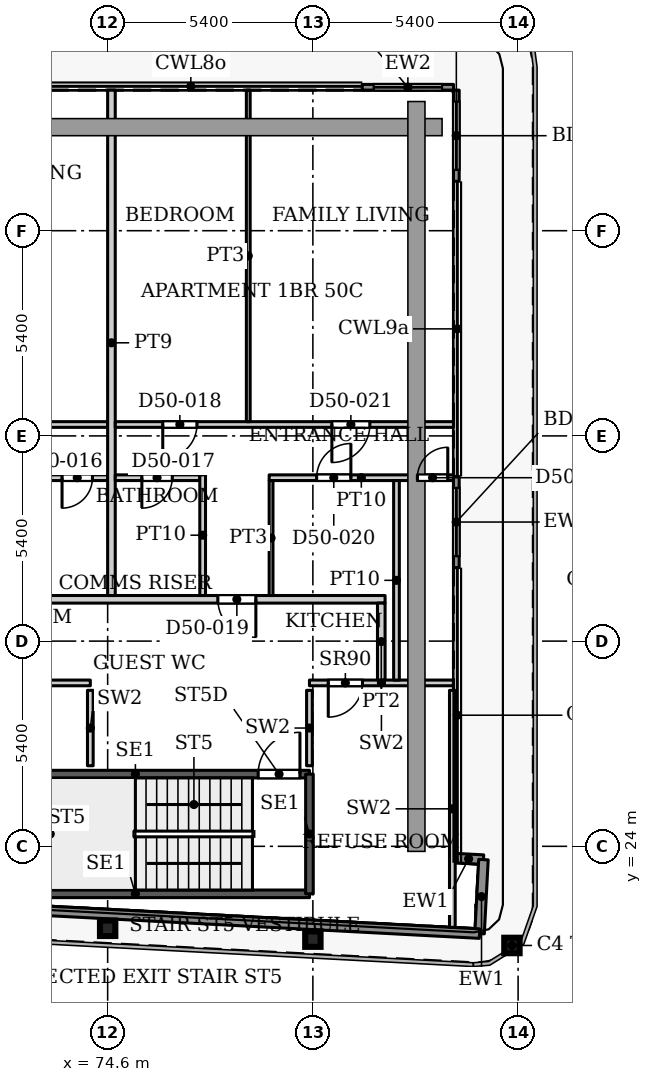
"""IFC4 building model, lengths in metres.
Left out: names, types, materials, properties, quantities, classifications, styles, units other than length and angle.
Written with IfcOpenShell. Run it as: python <this file> out.ifc"""

import sys

from ifc_helpers import new_model, si_unit, direction, frame, frame_2d, origin, origin_2d, place, context, subcontext, project, spatial, rectangle, i_section, extrude, source, transform, mapped, element, fill, save


model = new_model("IFC4")
c1 = context("Model", 3, precision=1e-05, world=origin(), true_north=direction((0.0, 1.0)))
c2 = subcontext(c1, "Body", "Model", "MODEL_VIEW")
j1 = project(units=[si_unit("LENGTHUNIT", "METRE"), si_unit("PLANEANGLEUNIT", "RADIAN")], contexts=[c1])
p1 = place(None, origin())
s1 = spatial("IfcSite", under=j1, at=p1, CompositionType="ELEMENT")
p2 = place(p1, origin())
s2 = spatial("IfcBuilding", under=s1, at=p2, CompositionType="ELEMENT")
p3 = place(p2, frame((0.0, 0.0, 216.2)))
s3 = spatial("IfcBuildingStorey", under=s2, at=p3, CompositionType="ELEMENT", Elevation=216.2)
for number, where, z_axis, x_axis in (
    (1, (85.238, 21.391, 0.0), (0.0, 0.0, 1.0), (1.0, 0.0, 0.0)),
    (2, (80.0, 21.558, 0.0), (0.0, 0.0, 1.0), (1.0, 0.0, 0.0)),
    (3, (74.6, 21.843, 0.0), (0.0, 0.0, 1.0), (1.0, 0.0, 0.0)),
):
    element("IfcColumn", number, at=place(p3, frame(where, z_axis=z_axis, x_axis=x_axis)), inside=s3, PredefinedType="COLUMN", context=c2, shape_type="SweptSolid", body=[
        extrude(i_section(OverallWidth=0.404, OverallDepth=0.407, WebThickness=0.027, FlangeThickness=0.044, FilletRadius=0.012, at=origin_2d()), origin(), (0.0, 0.0, 1.0), 3.9),
    ])
p4 = place(p3, frame((81.3, 43.975, 0.0), z_axis=(0.0, 0.0, 1.0), x_axis=(1.0, 0.0, 0.0)))
e4 = element("IfcWall", 4, at=p4, inside=s3, PredefinedType="SOLIDWALL", context=c2, shape_type="SweptSolid", body=[
    extrude(rectangle(XDim=2.4, YDim=0.15, at=frame_2d((1.2, 0.0))), origin(), (0.0, 0.0, 1.0), 3.75),
])
p5 = place(p4, frame((0.3, 0.0, 0.0)))
e5 = element("IfcOpeningElement", 5, at=p5, cuts=e4, PredefinedType="OPENING", context=c2, shape_type="SweptSolid", body=[
    extrude(rectangle(XDim=1.8, YDim=2.4, at=frame_2d((0.9, 1.2))), frame((0.0, 0.085, 0.0), z_axis=(0.0, -1.0, 0.0), x_axis=(1.0, 0.0, 0.0)), (0.0, 0.0, 1.0), 0.17),
])
p6 = place(p3, frame((83.775, 43.9, 0.0), z_axis=(0.0, 0.0, 1.0), x_axis=(0.0, -1.0, 0.0)))
e6 = element("IfcWall", 6, at=p6, inside=s3, PredefinedType="SOLIDWALL", context=c2, shape_type="SweptSolid", body=[
    extrude(rectangle(XDim=2.4, YDim=0.15, at=frame_2d((1.2, 0.0))), origin(), (0.0, 0.0, 1.0), 3.75),
])
p7 = place(p6, frame((0.3, 0.0, 0.0)))
e7 = element("IfcOpeningElement", 7, at=p7, cuts=e6, PredefinedType="OPENING", context=c2, shape_type="SweptSolid", body=[
    extrude(rectangle(XDim=1.8, YDim=2.4, at=frame_2d((0.9, 1.2))), frame((0.0, 0.085, 0.0), z_axis=(0.0, -1.0, 0.0), x_axis=(1.0, 0.0, 0.0)), (0.0, 0.0, 1.0), 0.17),
])
p8 = place(p3, frame((83.775, 33.733, 0.0), z_axis=(0.0, 0.0, 1.0), x_axis=(0.0, -1.0, 0.0)))
e8 = element("IfcWall", 8, at=p8, inside=s3, PredefinedType="SOLIDWALL", context=c2, shape_type="SweptSolid", body=[
    extrude(rectangle(XDim=2.399, YDim=0.15, at=frame_2d((1.199, 0.0))), origin(), (0.0, 0.0, 1.0), 3.75),
])
p9 = place(p8, frame((0.3, 0.0, 0.0)))
e9 = element("IfcOpeningElement", 9, at=p9, cuts=e8, PredefinedType="OPENING", context=c2, shape_type="SweptSolid", body=[
    extrude(rectangle(XDim=1.8, YDim=2.4, at=frame_2d((0.9, 1.2))), frame((0.0, 0.085, 0.0), z_axis=(0.0, -1.0, 0.0), x_axis=(1.0, 0.0, 0.0)), (0.0, 0.0, 1.0), 0.17),
])
p10 = place(p3, frame((83.707, 23.692, 0.0), z_axis=(0.0, 0.0, 1.0), x_axis=(0.998561284263, -0.053622398031, 0.0)))
e10 = element("IfcWall", 10, at=p10, inside=s3, PredefinedType="SOLIDWALL", context=c2, shape_type="SweptSolid", body=[
    extrude(rectangle(XDim=0.783, YDim=0.25, at=frame_2d((0.392, 0.0))), origin(), (0.0, 0.0, 1.0), 3.75),
])
p11 = place(p3, frame((84.489, 23.65, 0.0), z_axis=(0.0, 0.0, 1.0), x_axis=(-0.052841433274, -0.998602915542, 0.0)))
e11 = element("IfcWall", 11, at=p11, inside=s3, PredefinedType="SOLIDWALL", context=c2, shape_type="SweptSolid", body=[
    extrude(rectangle(XDim=1.95, YDim=0.25, at=frame_2d((0.975, 0.0))), origin(), (0.0, 0.0, 1.0), 3.75),
])
p12 = place(p3, frame((84.386, 21.703, 0.0), z_axis=(0.0, 0.0, 1.0), x_axis=(-0.998617508267, 0.05256493302, 0.0)))
e12 = element("IfcWall", 12, at=p12, inside=s3, PredefinedType="SOLIDWALL", context=c2, shape_type="SweptSolid", body=[
    extrude(rectangle(XDim=50.417, YDim=0.25, at=frame_2d((25.208, 0.0))), origin(), (0.0, 0.0, 1.0), 3.75),
])
p13 = place(p3, frame((70.75, 22.75, 0.0), z_axis=(0.0, 0.0, 1.0), x_axis=(1.0, 0.0, 0.0)))
e13 = element("IfcWall", 13, at=p13, inside=s3, PredefinedType="SHEAR", context=c2, shape_type="SweptSolid", body=[
    extrude(rectangle(XDim=9.16, YDim=0.2, at=frame_2d((4.58, 0.0))), origin(), (0.0, 0.0, 1.0), 3.9),
])
p14 = place(p3, frame((70.75, 25.9, 0.0), z_axis=(0.0, 0.0, 1.0), x_axis=(1.0, 0.0, 0.0)))
e14 = element("IfcWall", 14, at=p14, inside=s3, PredefinedType="SHEAR", context=c2, shape_type="SweptSolid", body=[
    extrude(rectangle(XDim=9.16, YDim=0.2, at=frame_2d((4.58, 0.0))), origin(), (0.0, 0.0, 1.0), 3.9),
])
p15 = place(p14, frame((7.81, 0.0, 0.0)))
e15 = element("IfcOpeningElement", 15, at=p15, cuts=e14, PredefinedType="OPENING", context=c2, shape_type="SweptSolid", body=[
    extrude(rectangle(XDim=1.1, YDim=2.2, at=frame_2d((0.55, 1.1))), frame((0.0, 0.11, 0.0), z_axis=(0.0, -1.0, 0.0), x_axis=(1.0, 0.0, 0.0)), (0.0, 0.0, 1.0), 0.22),
])
p16 = place(p3, frame((79.91, 22.75, 0.0), z_axis=(0.0, 0.0, 1.0), x_axis=(0.0, 1.0, 0.0)))
e16 = element("IfcWall", 16, at=p16, inside=s3, PredefinedType="SHEAR", context=c2, shape_type="SweptSolid", body=[
    extrude(rectangle(XDim=3.15, YDim=0.2, at=frame_2d((1.575, 0.0))), origin(), (0.0, 0.0, 1.0), 3.9),
])
p17 = place(p3, frame((70.75, 28.3, 0.0), z_axis=(0.0, 0.0, 1.0), x_axis=(1.0, 0.0, 0.0)))
e17 = element("IfcWall", 17, at=p17, inside=s3, PredefinedType="PARTITIONING", context=c2, shape_type="SweptSolid", body=[
    extrude(rectangle(XDim=3.394, YDim=0.15, at=frame_2d((1.697, 0.0))), origin(), (0.0, 0.0, 1.0), 3.9),
])
p18 = place(p17, frame((1.247, 0.0, 0.0)))
e18 = element("IfcOpeningElement", 18, at=p18, cuts=e17, PredefinedType="OPENING", context=c2, shape_type="SweptSolid", body=[
    extrude(rectangle(XDim=0.9, YDim=2.2, at=frame_2d((0.45, 1.1))), frame((0.0, 0.085, 0.0), z_axis=(0.0, -1.0, 0.0), x_axis=(1.0, 0.0, 0.0)), (0.0, 0.0, 1.0), 0.17),
])
p19 = place(p3, frame((74.144, 26.12, 0.0), z_axis=(0.0, 0.0, 1.0), x_axis=(0.0, 1.0, 0.0)))
e19 = element("IfcWall", 19, at=p19, inside=s3, PredefinedType="PARTITIONING", context=c2, shape_type="SweptSolid", body=[
    extrude(rectangle(XDim=1.985, YDim=0.15, at=frame_2d((0.992, 0.0))), origin(), (0.0, 0.0, 1.0), 3.9),
])
p20 = place(p3, frame((79.91, 28.3, 0.0), z_axis=(0.0, 0.0, 1.0), x_axis=(1.0, 0.0, 0.0)))
e20 = element("IfcWall", 20, at=p20, inside=s3, PredefinedType="PARTITIONING", context=c2, shape_type="SweptSolid", body=[
    extrude(rectangle(XDim=3.788, YDim=0.15, at=frame_2d((1.894, 0.0))), origin(), (0.0, 0.0, 1.0), 3.9),
])
p21 = place(p20, frame((0.495, 0.0, 0.0)))
e21 = element("IfcOpeningElement", 21, at=p21, cuts=e20, PredefinedType="OPENING", context=c2, shape_type="SweptSolid", body=[
    extrude(rectangle(XDim=0.9, YDim=2.2, at=frame_2d((0.45, 1.1))), frame((0.0, 0.085, 0.0), z_axis=(0.0, -1.0, 0.0), x_axis=(1.0, 0.0, 0.0)), (0.0, 0.0, 1.0), 0.17),
])
p22 = place(p3, frame((79.91, 26.12, 0.0), z_axis=(0.0, 0.0, 1.0), x_axis=(0.0, 1.0, 0.0)))
e22 = element("IfcWall", 22, at=p22, inside=s3, PredefinedType="PARTITIONING", context=c2, shape_type="SweptSolid", body=[
    extrude(rectangle(XDim=1.985, YDim=0.15, at=frame_2d((0.992, 0.0))), origin(), (0.0, 0.0, 1.0), 3.9),
])
p23 = place(p3, frame((83.67, 21.868, 0.0), z_axis=(0.0, 0.0, 1.0), x_axis=(0.0, 1.0, 0.0)))
e23 = element("IfcWall", 23, at=p23, inside=s3, PredefinedType="PARTITIONING", context=c2, shape_type="SweptSolid", body=[
    extrude(rectangle(XDim=6.237, YDim=0.15, at=frame_2d((3.119, 0.0))), origin(), (0.0, 0.0, 1.0), 3.9),
])
p24 = place(p3, frame((53.499, 30.5, 0.0), z_axis=(0.0, 0.0, 1.0), x_axis=(1.0, 0.0, 0.0)))
e24 = element("IfcWall", 24, at=p24, inside=s3, PredefinedType="PARTITIONING", context=c2, shape_type="SweptSolid", body=[
    extrude(rectangle(XDim=28.401, YDim=0.2, at=frame_2d((14.2, 0.0))), origin(), (0.0, 0.0, 1.0), 3.6),
])
p25 = place(p24, frame((10.201, 0.0, 0.0)))
e25 = element("IfcOpeningElement", 25, at=p25, cuts=e24, PredefinedType="OPENING", context=c2, shape_type="SweptSolid", body=[
    extrude(rectangle(XDim=1.0, YDim=2.1, at=frame_2d((0.5, 1.05))), frame((0.0, 0.11, 0.0), z_axis=(0.0, -1.0, 0.0), x_axis=(1.0, 0.0, 0.0)), (0.0, 0.0, 1.0), 0.22),
])
p26 = place(p24, frame((12.151, 0.0, 0.0)))
e26 = element("IfcOpeningElement", 26, at=p26, cuts=e24, PredefinedType="OPENING", context=c2, shape_type="SweptSolid", body=[
    extrude(rectangle(XDim=1.0, YDim=2.1, at=frame_2d((0.5, 1.05))), frame((0.0, 0.11, 0.0), z_axis=(0.0, -1.0, 0.0), x_axis=(1.0, 0.0, 0.0)), (0.0, 0.0, 1.0), 0.22),
])
p27 = place(p24, frame((24.001, 0.0, 0.0)))
e27 = element("IfcOpeningElement", 27, at=p27, cuts=e24, PredefinedType="OPENING", context=c2, shape_type="SweptSolid", body=[
    extrude(rectangle(XDim=1.0, YDim=2.1, at=frame_2d((0.5, 1.05))), frame((0.0, 0.11, 0.0), z_axis=(0.0, -1.0, 0.0), x_axis=(1.0, 0.0, 0.0)), (0.0, 0.0, 1.0), 0.22),
])
p28 = place(p3, frame((65.2, 35.1, 0.0), z_axis=(0.0, 0.0, 1.0), x_axis=(1.0, 0.0, 0.0)))
e28 = element("IfcWall", 28, at=p28, inside=s3, PredefinedType="PARTITIONING", context=c2, shape_type="SweptSolid", body=[
    extrude(rectangle(XDim=9.4, YDim=0.15, at=frame_2d((4.7, 0.0))), origin(), (0.0, 0.0, 1.0), 3.6),
])
p29 = place(p28, frame((1.4, 0.0, 0.0)))
e29 = element("IfcOpeningElement", 29, at=p29, cuts=e28, PredefinedType="OPENING", context=c2, shape_type="SweptSolid", body=[
    extrude(rectangle(XDim=0.9, YDim=2.1, at=frame_2d((0.45, 1.05))), frame((0.0, 0.085, 0.0), z_axis=(0.0, -1.0, 0.0), x_axis=(1.0, 0.0, 0.0)), (0.0, 0.0, 1.0), 0.17),
])
p30 = place(p28, frame((6.15, 0.0, 0.0)))
e30 = element("IfcOpeningElement", 30, at=p30, cuts=e28, PredefinedType="OPENING", context=c2, shape_type="SweptSolid", body=[
    extrude(rectangle(XDim=1.0, YDim=2.1, at=frame_2d((0.5, 1.05))), frame((0.0, 0.085, 0.0), z_axis=(0.0, -1.0, 0.0), x_axis=(1.0, 0.0, 0.0)), (0.0, 0.0, 1.0), 0.17),
])
p31 = place(p3, frame((67.125, 33.7, 0.0), z_axis=(0.0, 0.0, 1.0), x_axis=(1.0, 0.0, 0.0)))
e31 = element("IfcWall", 31, at=p31, inside=s3, PredefinedType="PARTITIONING", context=c2, shape_type="SweptSolid", body=[
    extrude(rectangle(XDim=7.475, YDim=0.15, at=frame_2d((3.738, 0.0))), origin(), (0.0, 0.0, 1.0), 3.6),
])
p32 = place(p31, frame((0.875, 0.0, 0.0)))
e32 = element("IfcOpeningElement", 32, at=p32, cuts=e31, PredefinedType="OPENING", context=c2, shape_type="SweptSolid", body=[
    extrude(rectangle(XDim=0.8, YDim=2.1, at=frame_2d((0.4, 1.05))), frame((0.0, 0.085, 0.0), z_axis=(0.0, -1.0, 0.0), x_axis=(1.0, 0.0, 0.0)), (0.0, 0.0, 1.0), 0.17),
])
p33 = place(p31, frame((3.675, 0.0, 0.0)))
e33 = element("IfcOpeningElement", 33, at=p33, cuts=e31, PredefinedType="OPENING", context=c2, shape_type="SweptSolid", body=[
    extrude(rectangle(XDim=0.9, YDim=2.1, at=frame_2d((0.45, 1.05))), frame((0.0, 0.085, 0.0), z_axis=(0.0, -1.0, 0.0), x_axis=(1.0, 0.0, 0.0)), (0.0, 0.0, 1.0), 0.17),
])
p34 = place(p31, frame((6.275, 0.0, 0.0)))
e34 = element("IfcOpeningElement", 34, at=p34, cuts=e31, PredefinedType="OPENING", context=c2, shape_type="SweptSolid", body=[
    extrude(rectangle(XDim=0.8, YDim=2.1, at=frame_2d((0.4, 1.05))), frame((0.0, 0.085, 0.0), z_axis=(0.0, -1.0, 0.0), x_axis=(1.0, 0.0, 0.0)), (0.0, 0.0, 1.0), 0.17),
])
p35 = place(p3, frame((74.7, 30.6, 0.0), z_axis=(0.0, 0.0, 1.0), x_axis=(0.0, 1.0, 0.0)))
e35 = element("IfcWall", 35, at=p35, inside=s3, PredefinedType="PARTITIONING", context=c2, shape_type="SweptSolid", body=[
    extrude(rectangle(XDim=13.3, YDim=0.2, at=frame_2d((6.65, 0.0))), origin(), (0.0, 0.0, 1.0), 3.6),
])
p36 = place(p3, frame((74.8, 33.7, 0.0), z_axis=(0.0, 0.0, 1.0), x_axis=(1.0, 0.0, 0.0)))
e36 = element("IfcWall", 36, at=p36, inside=s3, PredefinedType="PARTITIONING", context=c2, shape_type="SweptSolid", body=[
    extrude(rectangle(XDim=2.225, YDim=0.15, at=frame_2d((1.112, 0.0))), origin(), (0.0, 0.0, 1.0), 3.6),
])
p37 = place(p36, frame((0.7, 0.0, 0.0)))
e37 = element("IfcOpeningElement", 37, at=p37, cuts=e36, PredefinedType="OPENING", context=c2, shape_type="SweptSolid", body=[
    extrude(rectangle(XDim=0.8, YDim=2.1, at=frame_2d((0.4, 1.05))), frame((0.0, 0.085, 0.0), z_axis=(0.0, -1.0, 0.0), x_axis=(1.0, 0.0, 0.0)), (0.0, 0.0, 1.0), 0.17),
])
p38 = place(p3, frame((74.8, 35.1, 0.0), z_axis=(0.0, 0.0, 1.0), x_axis=(1.0, 0.0, 0.0)))
e38 = element("IfcWall", 38, at=p38, inside=s3, PredefinedType="PARTITIONING", context=c2, shape_type="SweptSolid", body=[
    extrude(rectangle(XDim=8.9, YDim=0.15, at=frame_2d((4.45, 0.0))), origin(), (0.0, 0.0, 1.0), 3.6),
])
p39 = place(p38, frame((1.25, 0.0, 0.0)))
e39 = element("IfcOpeningElement", 39, at=p39, cuts=e38, PredefinedType="OPENING", context=c2, shape_type="SweptSolid", body=[
    extrude(rectangle(XDim=0.9, YDim=2.1, at=frame_2d((0.45, 1.05))), frame((0.0, 0.085, 0.0), z_axis=(0.0, -1.0, 0.0), x_axis=(1.0, 0.0, 0.0)), (0.0, 0.0, 1.0), 0.17),
])
p40 = place(p38, frame((5.7, 0.0, 0.0)))
e40 = element("IfcOpeningElement", 40, at=p40, cuts=e38, PredefinedType="OPENING", context=c2, shape_type="SweptSolid", body=[
    extrude(rectangle(XDim=1.0, YDim=2.1, at=frame_2d((0.5, 1.05))), frame((0.0, 0.085, 0.0), z_axis=(0.0, -1.0, 0.0), x_axis=(1.0, 0.0, 0.0)), (0.0, 0.0, 1.0), 0.17),
])
p41 = place(p3, frame((77.1, 30.6, 0.0), z_axis=(0.0, 0.0, 1.0), x_axis=(0.0, 1.0, 0.0)))
e41 = element("IfcWall", 41, at=p41, inside=s3, PredefinedType="PARTITIONING", context=c2, shape_type="SweptSolid", body=[
    extrude(rectangle(XDim=3.175, YDim=0.15, at=frame_2d((1.587, 0.0))), origin(), (0.0, 0.0, 1.0), 3.6),
])
p42 = place(p3, frame((78.3, 35.175, 0.0), z_axis=(0.0, 0.0, 1.0), x_axis=(0.0, 1.0, 0.0)))
e42 = element("IfcWall", 42, at=p42, inside=s3, PredefinedType="PARTITIONING", context=c2, shape_type="SweptSolid", body=[
    extrude(rectangle(XDim=8.725, YDim=0.1, at=frame_2d((4.362, 0.0))), origin(), (0.0, 0.0, 1.0), 3.6),
])
p43 = place(p3, frame((78.85, 33.7, 0.0), z_axis=(0.0, 0.0, 1.0), x_axis=(1.0, 0.0, 0.0)))
e43 = element("IfcWall", 43, at=p43, inside=s3, PredefinedType="PARTITIONING", context=c2, shape_type="SweptSolid", body=[
    extrude(rectangle(XDim=4.85, YDim=0.15, at=frame_2d((2.425, 0.0))), origin(), (0.0, 0.0, 1.0), 3.6),
])
p44 = place(p43, frame((1.25, 0.0, 0.0)))
e44 = element("IfcOpeningElement", 44, at=p44, cuts=e43, PredefinedType="OPENING", context=c2, shape_type="SweptSolid", body=[
    extrude(rectangle(XDim=0.9, YDim=2.1, at=frame_2d((0.45, 1.05))), frame((0.0, 0.085, 0.0), z_axis=(0.0, -1.0, 0.0), x_axis=(1.0, 0.0, 0.0)), (0.0, 0.0, 1.0), 0.17),
])
p45 = place(p43, frame((3.9, 0.0, 0.0)))
e45 = element("IfcOpeningElement", 45, at=p45, cuts=e43, PredefinedType="OPENING", context=c2, shape_type="SweptSolid", body=[
    extrude(rectangle(XDim=0.8, YDim=2.1, at=frame_2d((0.4, 1.05))), frame((0.0, 0.085, 0.0), z_axis=(0.0, -1.0, 0.0), x_axis=(1.0, 0.0, 0.0)), (0.0, 0.0, 1.0), 0.17),
])
p46 = place(p3, frame((78.9, 30.6, 0.0), z_axis=(0.0, 0.0, 1.0), x_axis=(0.0, 1.0, 0.0)))
e46 = element("IfcWall", 46, at=p46, inside=s3, PredefinedType="PARTITIONING", context=c2, shape_type="SweptSolid", body=[
    extrude(rectangle(XDim=3.025, YDim=0.1, at=frame_2d((1.512, 0.0))), origin(), (0.0, 0.0, 1.0), 3.6),
])
p47 = place(p3, frame((81.8, 28.374, 0.0), z_axis=(0.0, 0.0, 1.0), x_axis=(0.0, 1.0, 0.0)))
e47 = element("IfcWall", 47, at=p47, inside=s3, PredefinedType="PARTITIONING", context=c2, shape_type="SweptSolid", body=[
    extrude(rectangle(XDim=2.026, YDim=0.2, at=frame_2d((1.013, 0.0))), origin(), (0.0, 0.0, 1.0), 3.6),
])
p48 = place(p3, frame((82.2, 28.374, 0.0), z_axis=(0.0, 0.0, 1.0), x_axis=(0.0, 1.0, 0.0)))
e48 = element("IfcWall", 48, at=p48, inside=s3, PredefinedType="PARTITIONING", context=c2, shape_type="SweptSolid", body=[
    extrude(rectangle(XDim=5.251, YDim=0.15, at=frame_2d((2.625, 0.0))), origin(), (0.0, 0.0, 1.0), 3.6),
])
m1 = source(origin(), c2, "Body", "SweptSolid", [
    extrude(rectangle(XDim=1.8, YDim=2.4, at=frame_2d((0.9, 1.2))), frame((0.0, 0.025, 0.0), z_axis=(0.0, -1.0, 0.0), x_axis=(1.0, 0.0, 0.0)), (0.0, 0.0, 1.0), 0.05),
])
p49 = place(p5, origin())
e49 = element("IfcDoor", 49, at=p49, inside=s3, OperationType="SLIDING_TO_LEFT", PredefinedType="DOOR", context=c2, shape_type="MappedRepresentation", body=[
    mapped(m1, transform((0.0, 0.0, 0.0), x_axis=(1.0, 0.0, 0.0), y_axis=(0.0, 1.0, 0.0), z_axis=(0.0, 0.0, 1.0), scale=1.0)),
])
fill(e5, e49)
p50 = place(p7, origin())
e50 = element("IfcDoor", 50, at=p50, inside=s3, OperationType="SLIDING_TO_LEFT", PredefinedType="DOOR", context=c2, shape_type="MappedRepresentation", body=[
    mapped(m1, transform((0.0, 0.0, 0.0), x_axis=(1.0, 0.0, 0.0), y_axis=(0.0, 1.0, 0.0), z_axis=(0.0, 0.0, 1.0), scale=1.0)),
])
fill(e7, e50)
p51 = place(p9, origin())
e51 = element("IfcDoor", 51, at=p51, inside=s3, OperationType="SLIDING_TO_LEFT", PredefinedType="DOOR", context=c2, shape_type="MappedRepresentation", body=[
    mapped(m1, transform((0.0, 0.0, 0.0), x_axis=(1.0, 0.0, 0.0), y_axis=(0.0, 1.0, 0.0), z_axis=(0.0, 0.0, 1.0), scale=1.0)),
])
fill(e9, e51)
m2 = source(origin(), c2, "Body", "SweptSolid", [
    extrude(rectangle(XDim=0.9, YDim=2.2, at=frame_2d((0.45, 1.1))), frame((0.0, 0.025, 0.0), z_axis=(0.0, -1.0, 0.0), x_axis=(1.0, 0.0, 0.0)), (0.0, 0.0, 1.0), 0.05),
])
p52 = place(p21, origin())
e52 = element("IfcDoor", 52, at=p52, inside=s3, OperationType="SINGLE_SWING_RIGHT", PredefinedType="DOOR", context=c2, shape_type="MappedRepresentation", body=[
    mapped(m2, transform((0.0, 0.0, 0.0), x_axis=(1.0, 0.0, 0.0), y_axis=(0.0, 1.0, 0.0), z_axis=(0.0, 0.0, 1.0), scale=1.0)),
])
fill(e21, e52)
m3 = source(origin(), c2, "Body", "SweptSolid", [
    extrude(rectangle(XDim=1.1, YDim=2.2, at=frame_2d((0.55, 1.1))), frame((0.0, 0.025, 0.0), z_axis=(0.0, -1.0, 0.0), x_axis=(1.0, 0.0, 0.0)), (0.0, 0.0, 1.0), 0.05),
])
p53 = place(p15, origin())
e53 = element("IfcDoor", 53, at=p53, inside=s3, OperationType="SINGLE_SWING_LEFT", PredefinedType="DOOR", context=c2, shape_type="MappedRepresentation", body=[
    mapped(m3, transform((0.0, 0.0, 0.0), x_axis=(1.0, 0.0, 0.0), y_axis=(0.0, 1.0, 0.0), z_axis=(0.0, 0.0, 1.0), scale=1.0)),
])
fill(e15, e53)
m4 = source(origin(), c2, "Body", "SweptSolid", [
    extrude(rectangle(XDim=0.8, YDim=2.1, at=frame_2d((0.4, 1.05))), frame((0.0, 0.025, 0.0), z_axis=(0.0, -1.0, 0.0), x_axis=(1.0, 0.0, 0.0)), (0.0, 0.0, 1.0), 0.05),
])
p54 = place(p34, origin())
e54 = element("IfcDoor", 54, at=p54, inside=s3, OperationType="SINGLE_SWING_RIGHT", PredefinedType="DOOR", context=c2, shape_type="MappedRepresentation", body=[
    mapped(m4, transform((0.0, 0.0, 0.0), x_axis=(1.0, 0.0, 0.0), y_axis=(0.0, 1.0, 0.0), z_axis=(0.0, 0.0, 1.0), scale=1.0)),
])
fill(e34, e54)
p55 = place(p37, origin())
e55 = element("IfcDoor", 55, at=p55, inside=s3, OperationType="SINGLE_SWING_RIGHT", PredefinedType="DOOR", context=c2, shape_type="MappedRepresentation", body=[
    mapped(m4, transform((0.0, 0.0, 0.0), x_axis=(1.0, 0.0, 0.0), y_axis=(0.0, 1.0, 0.0), z_axis=(0.0, 0.0, 1.0), scale=1.0)),
])
fill(e37, e55)
m5 = source(origin(), c2, "Body", "SweptSolid", [
    extrude(rectangle(XDim=0.9, YDim=2.1, at=frame_2d((0.45, 1.05))), frame((0.0, 0.025, 0.0), z_axis=(0.0, -1.0, 0.0), x_axis=(1.0, 0.0, 0.0)), (0.0, 0.0, 1.0), 0.05),
])
p56 = place(p39, origin())
e56 = element("IfcDoor", 56, at=p56, inside=s3, OperationType="SINGLE_SWING_RIGHT", PredefinedType="DOOR", context=c2, shape_type="MappedRepresentation", body=[
    mapped(m5, transform((0.0, 0.0, 0.0), x_axis=(1.0, 0.0, 0.0), y_axis=(0.0, 1.0, 0.0), z_axis=(0.0, 0.0, 1.0), scale=1.0)),
])
fill(e39, e56)
m6 = source(origin(), c2, "Body", "SweptSolid", [
    extrude(rectangle(XDim=1.0, YDim=2.1, at=frame_2d((0.5, 1.05))), frame((0.0, 0.025, 0.0), z_axis=(0.0, -1.0, 0.0), x_axis=(1.0, 0.0, 0.0)), (0.0, 0.0, 1.0), 0.05),
])
p57 = place(p27, origin())
e57 = element("IfcDoor", 57, at=p57, inside=s3, OperationType="SINGLE_SWING_RIGHT", PredefinedType="DOOR", context=c2, shape_type="MappedRepresentation", body=[
    mapped(m6, transform((0.0, 0.0, 0.0), x_axis=(1.0, 0.0, 0.0), y_axis=(0.0, 1.0, 0.0), z_axis=(0.0, 0.0, 1.0), scale=1.0)),
])
fill(e27, e57)
p58 = place(p44, origin())
e58 = element("IfcDoor", 58, at=p58, inside=s3, OperationType="SINGLE_SWING_LEFT", PredefinedType="DOOR", context=c2, shape_type="MappedRepresentation", body=[
    mapped(m5, transform((0.0, 0.0, 0.0), x_axis=(1.0, 0.0, 0.0), y_axis=(0.0, 1.0, 0.0), z_axis=(0.0, 0.0, 1.0), scale=1.0)),
])
fill(e44, e58)
m7 = source(origin(), c2, "Body", "SweptSolid", [
    extrude(rectangle(XDim=1.0, YDim=2.1, at=frame_2d((0.5, 1.05))), frame((0.0, 0.025, 0.0), z_axis=(0.0, -1.0, 0.0), x_axis=(1.0, 0.0, 0.0)), (0.0, 0.0, 1.0), 0.05),
])
p59 = place(p40, origin())
e59 = element("IfcDoor", 59, at=p59, inside=s3, OperationType="SINGLE_SWING_RIGHT", PredefinedType="DOOR", context=c2, shape_type="MappedRepresentation", body=[
    mapped(m7, transform((0.0, 0.0, 0.0), x_axis=(1.0, 0.0, 0.0), y_axis=(0.0, 1.0, 0.0), z_axis=(0.0, 0.0, 1.0), scale=1.0)),
])
fill(e40, e59)
p60 = place(p45, origin())
e60 = element("IfcDoor", 60, at=p60, inside=s3, OperationType="SINGLE_SWING_LEFT", PredefinedType="DOOR", context=c2, shape_type="MappedRepresentation", body=[
    mapped(m4, transform((0.0, 0.0, 0.0), x_axis=(1.0, 0.0, 0.0), y_axis=(0.0, 1.0, 0.0), z_axis=(0.0, 0.0, 1.0), scale=1.0)),
])
fill(e45, e60)
save(model, sys.argv[1])
